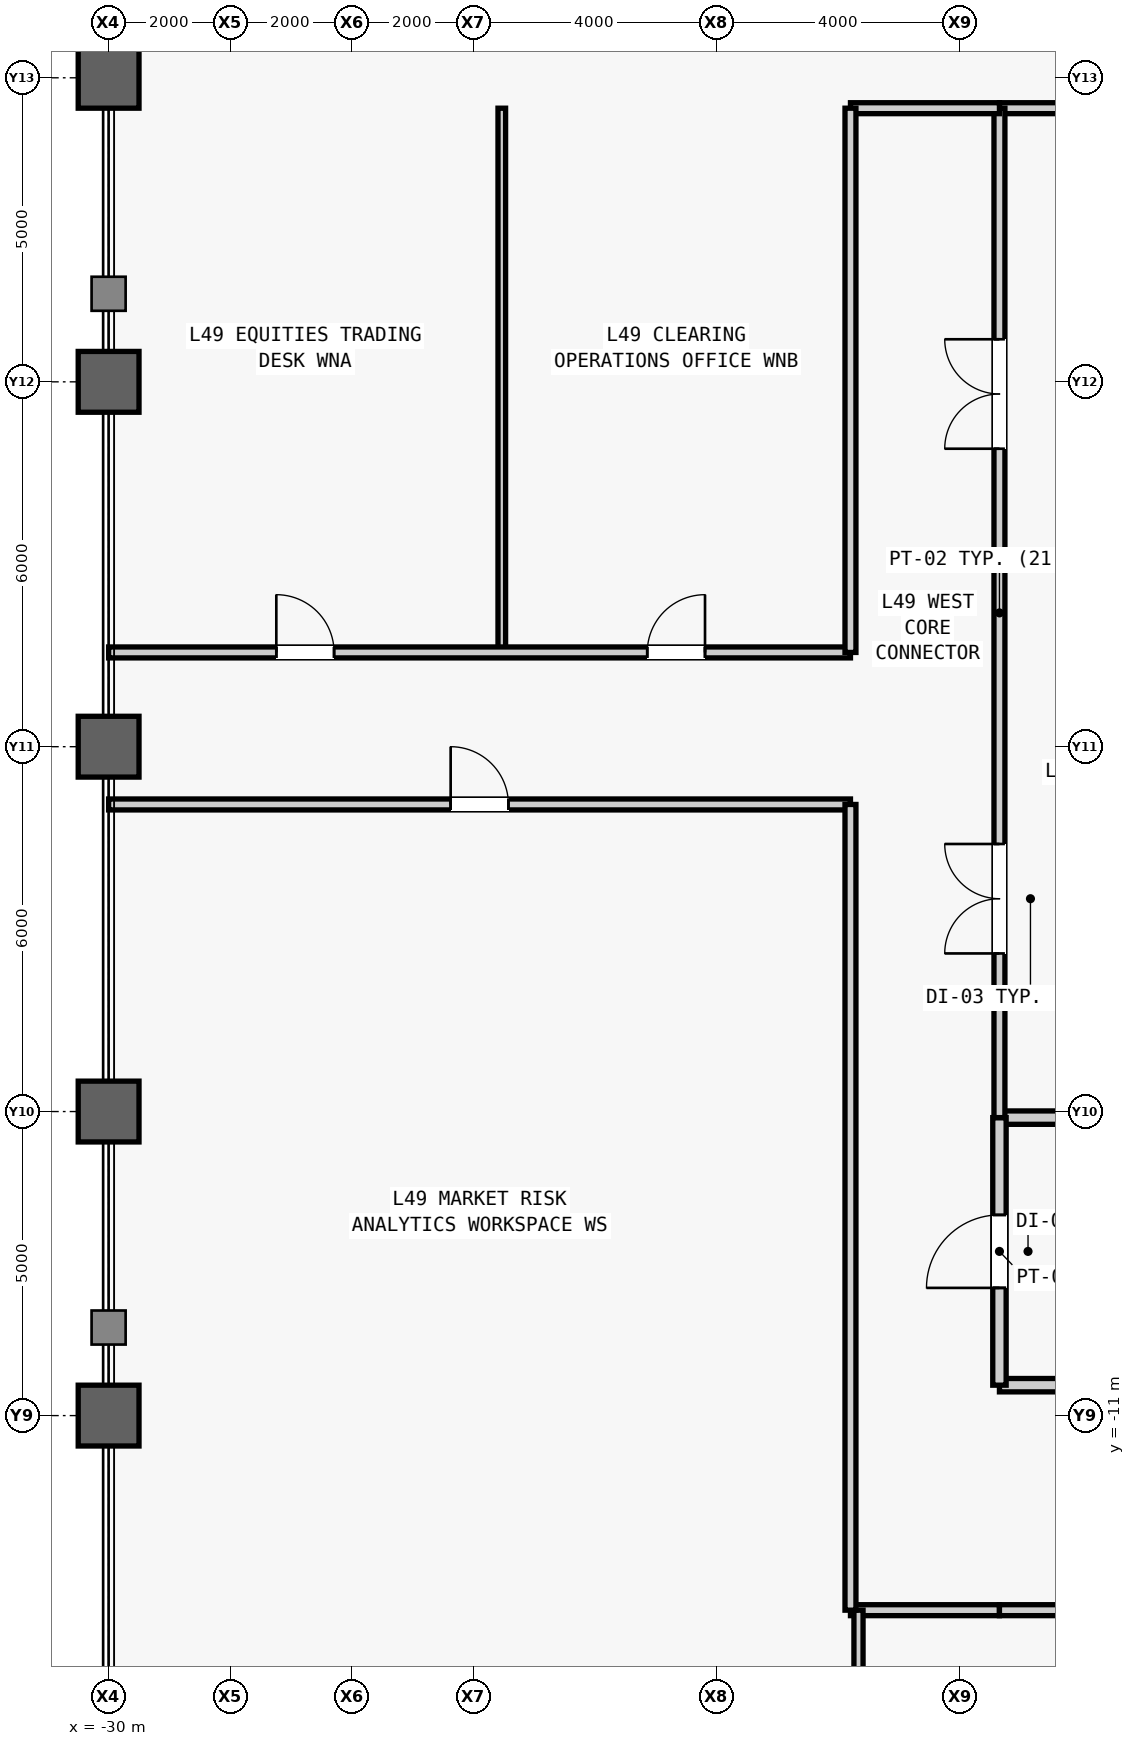
"""IFC4 building model, lengths in metres.
Left out: names, types, materials, properties, quantities, classifications, styles, units other than length and angle.
Written with IfcOpenShell. Run it as: python <this file> out.ifc"""

import sys

from ifc_helpers import new_model, si_unit, direction, frame, frame_2d, origin, origin_2d, place, context, subcontext, project, spatial, rectangle, hollow_rectangle, extrude, source, transform, mapped, element, fill, save


model = new_model("IFC4")
c1 = context("Model", 3, precision=1e-05, world=origin(), true_north=direction((0.0, 1.0)))
c2 = subcontext(c1, "Body", "Model", "MODEL_VIEW")
j1 = project(units=[si_unit("LENGTHUNIT", "METRE"), si_unit("PLANEANGLEUNIT", "RADIAN")], contexts=[c1])
p1 = place(None, origin())
s1 = spatial("IfcSite", under=j1, at=p1, CompositionType="ELEMENT")
p2 = place(p1, origin())
s2 = spatial("IfcBuilding", under=s1, at=p2, CompositionType="ELEMENT")
p3 = place(p2, frame((0.0, 0.0, 211.1)))
s3 = spatial("IfcBuildingStorey", under=s2, at=p3, CompositionType="ELEMENT", Elevation=211.1)
m1 = source(origin(), c2, "Body", "SweptSolid", [
    extrude(hollow_rectangle(XDim=1.0, YDim=1.0, WallThickness=0.055, at=origin_2d()), origin(), (0.0, 0.0, 1.0), 4.0),
])
for number, where, z_axis, x_axis in (
    (1, (-30.0, -11.0, 0.0), (0.0, 0.0, 1.0), (1.0, 0.0, 0.0)),
    (2, (-30.0, -6.0, 0.0), (0.0, 0.0, 1.0), (1.0, 0.0, 0.0)),
    (3, (-30.0, 0.0, 0.0), (0.0, 0.0, 1.0), (1.0, 0.0, 0.0)),
    (4, (-30.0, 6.0, 0.0), (0.0, 0.0, 1.0), (1.0, 0.0, 0.0)),
    (5, (-30.0, 11.0, 0.0), (0.0, 0.0, 1.0), (1.0, 0.0, 0.0)),
):
    element("IfcColumn", number, at=place(p3, frame(where, z_axis=z_axis, x_axis=x_axis)), inside=s3, PredefinedType="COLUMN", context=c2, shape_type="MappedRepresentation", body=[
        mapped(m1, transform((0.0, 0.0, 0.0), scale=1.0)),
    ])
m2 = source(origin(), c2, "Body", "SweptSolid", [
    extrude(rectangle(XDim=4.05, YDim=0.22, at=frame_2d((2.025, 0.0))), origin(), (0.0, 0.0, 1.0), 3.78),
])
p4 = place(p3, frame((-15.35, -10.5, 0.0), z_axis=(0.0, 0.0, 1.0), x_axis=(1.0, 0.0, 0.0)))
e6 = element("IfcWall", 6, at=p4, inside=s3, PredefinedType="PARTITIONING", context=c2, shape_type="MappedRepresentation", body=[
    mapped(m2, transform((0.0, 0.0, 0.0), scale=1.0)),
])
m3 = source(origin(), c2, "Body", "SweptSolid", [
    extrude(rectangle(XDim=4.05, YDim=0.22, at=frame_2d((2.025, 0.0))), origin(), (0.0, 0.0, 1.0), 3.085),
])
p5 = place(p3, frame((-15.35, -6.1, 0.0), z_axis=(0.0, 0.0, 1.0), x_axis=(1.0, 0.0, 0.0)))
e7 = element("IfcWall", 7, at=p5, inside=s3, PredefinedType="PARTITIONING", context=c2, shape_type="MappedRepresentation", body=[
    mapped(m3, transform((0.0, 0.0, 0.0), scale=1.0)),
])
m4 = source(origin(), c2, "Body", "SweptSolid", [
    extrude(rectangle(XDim=4.4, YDim=0.22, at=frame_2d((2.2, 0.0))), origin(), (0.0, 0.0, 1.0), 3.78),
])
p6 = place(p3, frame((-15.35, -10.5, 0.0), z_axis=(0.0, 0.0, 1.0), x_axis=(0.0, 1.0, 0.0)))
e8 = element("IfcWall", 8, at=p6, inside=s3, PredefinedType="PARTITIONING", context=c2, shape_type="MappedRepresentation", body=[
    mapped(m4, transform((0.0, 0.0, 0.0), scale=1.0)),
])
m5 = source(origin(), c2, "Body", "SweptSolid", [
    extrude(rectangle(XDim=1.2, YDim=2.2, at=frame_2d((0.6, 1.1))), frame((0.0, 0.12, 0.0), z_axis=(0.0, -1.0, 0.0), x_axis=(1.0, 0.0, 0.0)), (0.0, 0.0, 1.0), 0.24),
])
p7 = place(p6, frame((1.6, 0.0, 0.0)))
e9 = element("IfcOpeningElement", 9, at=p7, cuts=e8, PredefinedType="OPENING", context=c2, shape_type="MappedRepresentation", body=[
    mapped(m5, transform((0.0, 0.0, 0.0), scale=1.0)),
])
m6 = source(origin(), c2, "Body", "SweptSolid", [
    extrude(rectangle(XDim=4.05, YDim=0.18, at=frame_2d((2.025, 0.0))), origin(), (0.0, 0.0, 1.0), 3.78),
])
p8 = place(p3, frame((-15.35, 10.5, 0.0), z_axis=(0.0, 0.0, 1.0), x_axis=(1.0, 0.0, 0.0)))
e10 = element("IfcWall", 10, at=p8, inside=s3, PredefinedType="PARTITIONING", context=c2, shape_type="MappedRepresentation", body=[
    mapped(m6, transform((0.0, 0.0, 0.0), scale=1.0)),
])
m7 = source(origin(), c2, "Body", "SweptSolid", [
    extrude(rectangle(XDim=16.6, YDim=0.18, at=frame_2d((8.3, 0.0))), origin(), (0.0, 0.0, 1.0), 3.78),
])
p9 = place(p3, frame((-15.35, -6.1, 0.0), z_axis=(0.0, 0.0, 1.0), x_axis=(0.0, 1.0, 0.0)))
e11 = element("IfcWall", 11, at=p9, inside=s3, PredefinedType="PARTITIONING", context=c2, shape_type="MappedRepresentation", body=[
    mapped(m7, transform((0.0, 0.0, 0.0), scale=1.0)),
])
m8 = source(origin(), c2, "Body", "SweptSolid", [
    extrude(rectangle(XDim=1.8, YDim=2.25, at=frame_2d((0.9, 1.125))), frame((0.0, 0.1, 0.0), z_axis=(0.0, -1.0, 0.0), x_axis=(1.0, 0.0, 0.0)), (0.0, 0.0, 1.0), 0.2),
])
p10 = place(p9, frame((2.7, 0.0, 0.0)))
e12 = element("IfcOpeningElement", 12, at=p10, cuts=e11, PredefinedType="OPENING", context=c2, shape_type="MappedRepresentation", body=[
    mapped(m8, transform((0.0, 0.0, 0.0), scale=1.0)),
])
p11 = place(p9, frame((11.0, 0.0, 0.0)))
e13 = element("IfcOpeningElement", 13, at=p11, cuts=e11, PredefinedType="OPENING", context=c2, shape_type="MappedRepresentation", body=[
    mapped(m8, transform((0.0, 0.0, 0.0), scale=1.0)),
])
m9 = source(origin(), c2, "Body", "SweptSolid", [
    extrude(rectangle(XDim=2.45, YDim=0.18, at=frame_2d((1.225, 0.0))), origin(), (0.0, 0.0, 1.0), 3.78),
])
for number, where, z_axis, x_axis in (
    (14, (-17.8, 10.5, 0.0), (0.0, 0.0, 1.0), (1.0, 0.0, 0.0)),
    (15, (-17.8, -14.2, 0.0), (0.0, 0.0, 1.0), (1.0, 0.0, 0.0)),
):
    element("IfcWall", number, at=place(p3, frame(where, z_axis=z_axis, x_axis=x_axis)), inside=s3, PredefinedType="PARTITIONING", context=c2, shape_type="MappedRepresentation", body=[
        mapped(m9, transform((0.0, 0.0, 0.0), scale=1.0)),
    ])
m10 = source(origin(), c2, "Body", "SweptSolid", [
    extrude(rectangle(XDim=15.8, YDim=0.15, at=frame_2d((7.9, 0.0))), origin(), (0.0, 0.0, 1.0), 3.78),
])
p12 = place(p3, frame((-17.668, -30.0, 0.0), z_axis=(0.0, 0.0, 1.0), x_axis=(0.0, 1.0, 0.0)))
e16 = element("IfcWall", 16, at=p12, inside=s3, PredefinedType="PARTITIONING", context=c2, shape_type="MappedRepresentation", body=[
    mapped(m10, transform((0.0, 0.0, 0.0), scale=1.0)),
])
m11 = source(origin(), c2, "Body", "SweptSolid", [
    extrude(rectangle(XDim=0.95, YDim=2.15, at=frame_2d((0.475, 1.075))), frame((0.0, 0.085, 0.0), z_axis=(0.0, -1.0, 0.0), x_axis=(1.0, 0.0, 0.0)), (0.0, 0.0, 1.0), 0.17),
])
p13 = place(p12, frame((11.375, 0.0, 0.0)))
e17 = element("IfcOpeningElement", 17, at=p13, cuts=e16, PredefinedType="OPENING", context=c2, shape_type="MappedRepresentation", body=[
    mapped(m11, transform((0.0, 0.0, 0.0), scale=1.0)),
])
m12 = source(origin(), c2, "Body", "SweptSolid", [
    extrude(rectangle(XDim=18.55, YDim=0.18, at=frame_2d((9.275, 0.0))), origin(), (0.0, 0.0, 1.0), 3.78),
])
p14 = place(p3, frame((-15.35, -14.2, 0.0), z_axis=(0.0, 0.0, 1.0), x_axis=(1.0, 0.0, 0.0)))
e18 = element("IfcWall", 18, at=p14, inside=s3, PredefinedType="PARTITIONING", context=c2, shape_type="MappedRepresentation", body=[
    mapped(m12, transform((0.0, 0.0, 0.0), scale=1.0)),
])
m13 = source(origin(), c2, "Body", "SweptSolid", [
    extrude(rectangle(XDim=12.2, YDim=0.18, at=frame_2d((6.1, 0.0))), origin(), (0.0, 0.0, 1.0), 3.78),
])
p15 = place(p3, frame((-30.0, -0.95, 0.0), z_axis=(0.0, 0.0, 1.0), x_axis=(1.0, 0.0, 0.0)))
e19 = element("IfcWall", 19, at=p15, inside=s3, PredefinedType="PARTITIONING", context=c2, shape_type="MappedRepresentation", body=[
    mapped(m13, transform((0.0, 0.0, 0.0), scale=1.0)),
])
m14 = source(origin(), c2, "Body", "SweptSolid", [
    extrude(rectangle(XDim=0.95, YDim=2.15, at=frame_2d((0.475, 1.075))), frame((0.0, 0.1, 0.0), z_axis=(0.0, -1.0, 0.0), x_axis=(1.0, 0.0, 0.0)), (0.0, 0.0, 1.0), 0.2),
])
p16 = place(p15, frame((5.625, 0.0, 0.0)))
e20 = element("IfcOpeningElement", 20, at=p16, cuts=e19, PredefinedType="OPENING", context=c2, shape_type="MappedRepresentation", body=[
    mapped(m14, transform((0.0, 0.0, 0.0), scale=1.0)),
])
m15 = source(origin(), c2, "Body", "SweptSolid", [
    extrude(rectangle(XDim=13.25, YDim=0.18, at=frame_2d((6.625, 0.0))), origin(), (0.0, 0.0, 1.0), 3.78),
])
p17 = place(p3, frame((-17.8, -14.2, 0.0), z_axis=(0.0, 0.0, 1.0), x_axis=(0.0, 1.0, 0.0)))
e21 = element("IfcWall", 21, at=p17, inside=s3, PredefinedType="PARTITIONING", context=c2, shape_type="MappedRepresentation", body=[
    mapped(m15, transform((0.0, 0.0, 0.0), scale=1.0)),
])
m16 = source(origin(), c2, "Body", "SweptSolid", [
    extrude(rectangle(XDim=8.95, YDim=0.125, at=frame_2d((4.475, 0.0))), origin(), (0.0, 0.0, 1.0), 3.78),
])
p18 = place(p3, frame((-23.534, 1.55, 0.0), z_axis=(0.0, 0.0, 1.0), x_axis=(0.0, 1.0, 0.0)))
e22 = element("IfcWall", 22, at=p18, inside=s3, PredefinedType="PARTITIONING", context=c2, shape_type="MappedRepresentation", body=[
    mapped(m16, transform((0.0, 0.0, 0.0), scale=1.0)),
])
p19 = place(p3, frame((-30.0, 1.55, 0.0), z_axis=(0.0, 0.0, 1.0), x_axis=(1.0, 0.0, 0.0)))
e23 = element("IfcWall", 23, at=p19, inside=s3, PredefinedType="PARTITIONING", context=c2, shape_type="MappedRepresentation", body=[
    mapped(m13, transform((0.0, 0.0, 0.0), scale=1.0)),
])
p20 = place(p19, frame((2.758, 0.0, 0.0)))
e24 = element("IfcOpeningElement", 24, at=p20, cuts=e23, PredefinedType="OPENING", context=c2, shape_type="MappedRepresentation", body=[
    mapped(m14, transform((0.0, 0.0, 0.0), scale=1.0)),
])
p21 = place(p19, frame((8.858, 0.0, 0.0)))
e25 = element("IfcOpeningElement", 25, at=p21, cuts=e23, PredefinedType="OPENING", context=c2, shape_type="MappedRepresentation", body=[
    mapped(m14, transform((0.0, 0.0, 0.0), scale=1.0)),
])
m17 = source(origin(), c2, "Body", "SweptSolid", [
    extrude(rectangle(XDim=8.95, YDim=0.18, at=frame_2d((4.475, 0.0))), origin(), (0.0, 0.0, 1.0), 3.78),
])
p22 = place(p3, frame((-17.8, 1.55, 0.0), z_axis=(0.0, 0.0, 1.0), x_axis=(0.0, 1.0, 0.0)))
e26 = element("IfcWall", 26, at=p22, inside=s3, PredefinedType="PARTITIONING", context=c2, shape_type="MappedRepresentation", body=[
    mapped(m17, transform((0.0, 0.0, 0.0), scale=1.0)),
])
m18 = source(origin(), c2, "Body", "SweptSolid", [
    extrude(rectangle(XDim=1.2, YDim=2.2, at=frame_2d((0.6, 1.1))), frame((0.0, 0.025, 0.0), z_axis=(0.0, -1.0, 0.0), x_axis=(1.0, 0.0, 0.0)), (0.0, 0.0, 1.0), 0.05),
])
p23 = place(p7, origin())
e27 = element("IfcDoor", 27, at=p23, inside=s3, OperationType="SINGLE_SWING_LEFT", PredefinedType="DOOR", context=c2, shape_type="MappedRepresentation", body=[
    mapped(m18, transform((0.0, 0.0, 0.0), scale=1.0)),
])
fill(e9, e27)
m19 = source(origin(), c2, "Body", "SweptSolid", [
    extrude(rectangle(XDim=1.8, YDim=2.25, at=frame_2d((0.9, 1.125))), frame((0.0, 0.025, 0.0), z_axis=(0.0, -1.0, 0.0), x_axis=(1.0, 0.0, 0.0)), (0.0, 0.0, 1.0), 0.05),
])
p24 = place(p10, origin())
e28 = element("IfcDoor", 28, at=p24, inside=s3, OperationType="SINGLE_SWING_LEFT", PredefinedType="DOOR", context=c2, shape_type="MappedRepresentation", body=[
    mapped(m19, transform((0.0, 0.0, 0.0), scale=1.0)),
])
fill(e12, e28)
p25 = place(p11, origin())
e29 = element("IfcDoor", 29, at=p25, inside=s3, OperationType="SINGLE_SWING_RIGHT", PredefinedType="DOOR", context=c2, shape_type="MappedRepresentation", body=[
    mapped(m19, transform((0.0, 0.0, 0.0), scale=1.0)),
])
fill(e13, e29)
m20 = source(origin(), c2, "Body", "SweptSolid", [
    extrude(rectangle(XDim=0.95, YDim=2.15, at=frame_2d((0.475, 1.075))), frame((0.0, 0.025, 0.0), z_axis=(0.0, -1.0, 0.0), x_axis=(1.0, 0.0, 0.0)), (0.0, 0.0, 1.0), 0.05),
])
p26 = place(p16, origin())
e30 = element("IfcDoor", 30, at=p26, inside=s3, OperationType="SINGLE_SWING_LEFT", PredefinedType="DOOR", context=c2, shape_type="MappedRepresentation", body=[
    mapped(m20, transform((0.0, 0.0, 0.0), scale=1.0)),
])
fill(e20, e30)
p27 = place(p20, origin())
e31 = element("IfcDoor", 31, at=p27, inside=s3, OperationType="SINGLE_SWING_LEFT", PredefinedType="DOOR", context=c2, shape_type="MappedRepresentation", body=[
    mapped(m20, transform((0.0, 0.0, 0.0), scale=1.0)),
])
fill(e24, e31)
p28 = place(p21, origin())
e32 = element("IfcDoor", 32, at=p28, inside=s3, OperationType="SINGLE_SWING_RIGHT", PredefinedType="DOOR", context=c2, shape_type="MappedRepresentation", body=[
    mapped(m20, transform((0.0, 0.0, 0.0), scale=1.0)),
])
fill(e25, e32)
save(model, sys.argv[1])
